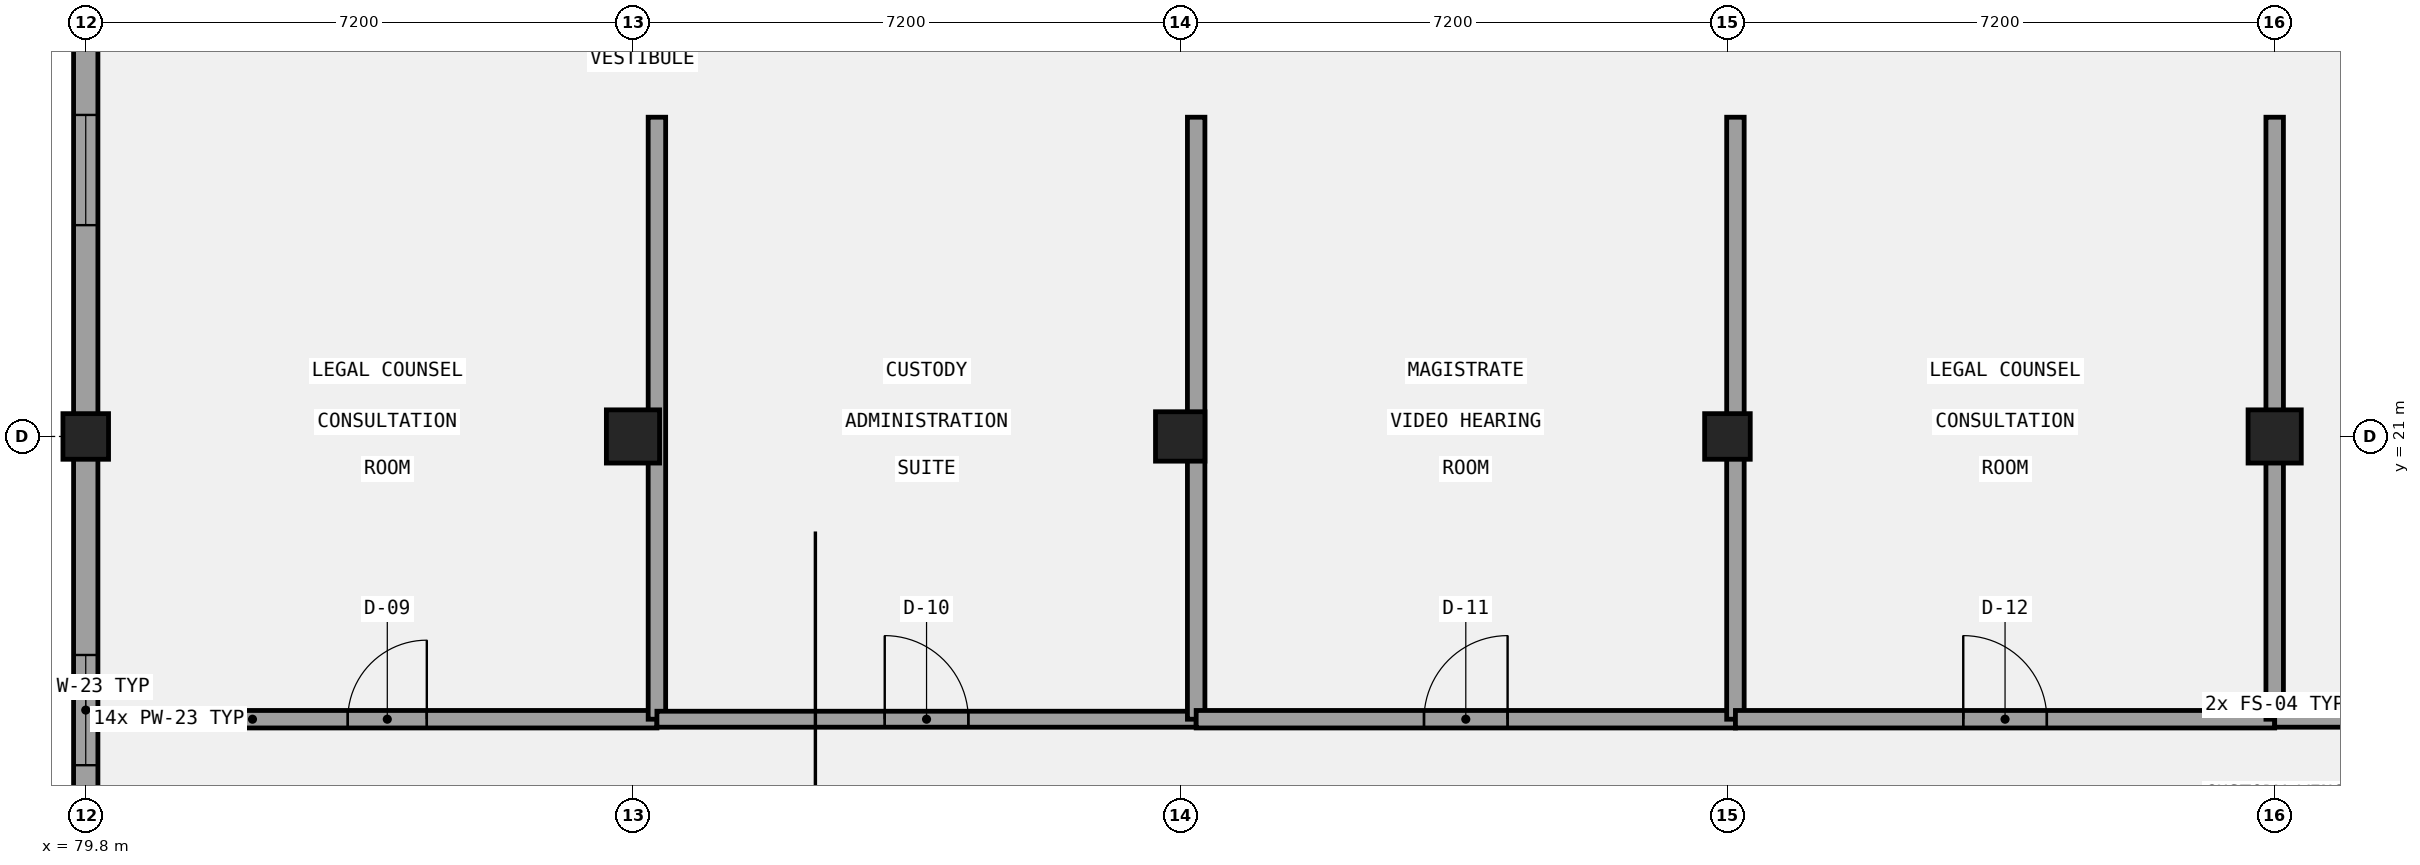
"""IFC4 building model, lengths in metres.
Left out: names, types, materials, properties, quantities, classifications, styles, units other than length and angle.
Written with IfcOpenShell. Run it as: python <this file> out.ifc"""

import sys

from ifc_helpers import new_model, si_unit, direction, frame, frame_2d, origin, origin_2d, place, context, subcontext, project, spatial, rectangle, extrude, element, fill, save


model = new_model("IFC4")
c1 = context("Model", 3, precision=1e-05, world=origin(), true_north=direction((0.0, 1.0)))
c2 = subcontext(c1, "Body", "Model", "MODEL_VIEW")
j1 = project(units=[si_unit("LENGTHUNIT", "METRE"), si_unit("PLANEANGLEUNIT", "RADIAN")], contexts=[c1])
p1 = place(None, origin())
s1 = spatial("IfcSite", under=j1, at=p1, CompositionType="ELEMENT")
p2 = place(p1, origin())
s2 = spatial("IfcBuilding", under=s1, at=p2, CompositionType="ELEMENT")
p3 = place(p2, frame((0.0, 0.0, 9.6)))
s3 = spatial("IfcBuildingStorey", under=s2, at=p3, CompositionType="ELEMENT", Elevation=9.6)
p4 = place(p3, frame((79.8, 21.0, 0.0), z_axis=(0.0, 0.0, 1.0), x_axis=(1.0, 0.0, 0.0)))
e1 = element("IfcColumn", 1, at=p4, inside=s3, PredefinedType="COLUMN", context=c2, shape_type="SweptSolid", body=[
    extrude(rectangle(XDim=0.6, YDim=0.6, at=origin_2d()), origin(), (0.0, 0.0, 1.0), 4.2),
])
p5 = place(p3, frame((87.0, 21.0, 0.0), z_axis=(0.0, 0.0, 1.0), x_axis=(1.0, 0.0, 0.0)))
e2 = element("IfcColumn", 2, at=p5, inside=s3, PredefinedType="COLUMN", context=c2, shape_type="SweptSolid", body=[
    extrude(rectangle(XDim=0.7, YDim=0.7, at=origin_2d()), origin(), (0.0, 0.0, 1.0), 4.2),
])
p6 = place(p3, frame((94.2, 21.0, 0.0), z_axis=(0.0, 0.0, 1.0), x_axis=(1.0, 0.0, 0.0)))
e3 = element("IfcColumn", 3, at=p6, inside=s3, PredefinedType="COLUMN", context=c2, shape_type="SweptSolid", body=[
    extrude(rectangle(XDim=0.65, YDim=0.65, at=origin_2d()), origin(), (0.0, 0.0, 1.0), 4.2),
])
p7 = place(p3, frame((101.4, 21.0, 0.0), z_axis=(0.0, 0.0, 1.0), x_axis=(1.0, 0.0, 0.0)))
e4 = element("IfcColumn", 4, at=p7, inside=s3, PredefinedType="COLUMN", context=c2, shape_type="SweptSolid", body=[
    extrude(rectangle(XDim=0.6, YDim=0.6, at=origin_2d()), origin(), (0.0, 0.0, 1.0), 4.2),
])
p8 = place(p3, frame((108.6, 21.0, 0.0), z_axis=(0.0, 0.0, 1.0), x_axis=(1.0, 0.0, 0.0)))
e5 = element("IfcColumn", 5, at=p8, inside=s3, PredefinedType="COLUMN", context=c2, shape_type="SweptSolid", body=[
    extrude(rectangle(XDim=0.7, YDim=0.7, at=origin_2d()), origin(), (0.0, 0.0, 1.0), 4.2),
])
p9 = place(p3, frame((79.8, 28.01, 0.0), z_axis=(0.0, 0.0, 1.0), x_axis=(0.0, -1.0, 0.0)))
e6 = element("IfcWall", 6, at=p9, inside=s3, PredefinedType="SOLIDWALL", context=c2, shape_type="SweptSolid", body=[
    extrude(rectangle(XDim=21.25, YDim=0.32, at=frame_2d((10.625, 0.0))), origin(), (0.0, 0.0, 1.0), 3.19),
])
p10 = place(p9, frame((17.005, 0.0, 1.0)))
e7 = element("IfcOpeningElement", 7, at=p10, cuts=e6, PredefinedType="OPENING", context=c2, shape_type="SweptSolid", body=[
    extrude(rectangle(XDim=1.45, YDim=1.9, at=frame_2d((0.725, 0.95))), frame((0.0, 0.17, 0.0), z_axis=(0.0, -1.0, 0.0), x_axis=(1.0, 0.0, 0.0)), (0.0, 0.0, 1.0), 0.34),
])
p11 = place(p9, frame((9.885, 0.0, 1.0)))
e8 = element("IfcOpeningElement", 8, at=p11, cuts=e6, PredefinedType="OPENING", context=c2, shape_type="SweptSolid", body=[
    extrude(rectangle(XDim=1.45, YDim=1.9, at=frame_2d((0.725, 0.95))), frame((0.0, 0.17, 0.0), z_axis=(0.0, -1.0, 0.0), x_axis=(1.0, 0.0, 0.0)), (0.0, 0.0, 1.0), 0.34),
])
p12 = place(p9, frame((2.78, 0.0, 1.0)))
e9 = element("IfcOpeningElement", 9, at=p12, cuts=e6, PredefinedType="OPENING", context=c2, shape_type="SweptSolid", body=[
    extrude(rectangle(XDim=1.45, YDim=1.9, at=frame_2d((0.725, 0.95))), frame((0.0, 0.17, 0.0), z_axis=(0.0, -1.0, 0.0), x_axis=(1.0, 0.0, 0.0)), (0.0, 0.0, 1.0), 0.34),
])
p13 = place(p3, frame((80.22, 17.28, 0.0), z_axis=(0.0, 0.0, 1.0), x_axis=(1.0, 0.0, 0.0)))
e10 = element("IfcWall", 10, at=p13, inside=s3, PredefinedType="PARTITIONING", context=c2, shape_type="SweptSolid", body=[
    extrude(rectangle(XDim=7.095, YDim=0.23, at=frame_2d((3.547, 0.0))), origin(), (0.0, 0.0, 1.0), 3.58),
])
p14 = place(p13, frame((3.028, 0.0, 0.0)))
e11 = element("IfcOpeningElement", 11, at=p14, cuts=e10, PredefinedType="OPENING", context=c2, shape_type="SweptSolid", body=[
    extrude(rectangle(XDim=1.04, YDim=2.35, at=frame_2d((0.52, 1.175))), frame((0.0, 0.125, 0.0), z_axis=(0.0, -1.0, 0.0), x_axis=(1.0, 0.0, 0.0)), (0.0, 0.0, 1.0), 0.25),
])
p15 = place(p3, frame((87.315, 17.28, 0.0), z_axis=(0.0, 0.0, 1.0), x_axis=(0.0, 1.0, 0.0)))
e12 = element("IfcWall", 12, at=p15, inside=s3, PredefinedType="PARTITIONING", context=c2, shape_type="SweptSolid", body=[
    extrude(rectangle(XDim=7.92, YDim=0.23, at=frame_2d((3.96, 0.0))), origin(), (0.0, 0.0, 1.0), 3.19),
])
p16 = place(p3, frame((87.315, 17.28, 0.0), z_axis=(0.0, 0.0, 1.0), x_axis=(1.0, 0.0, 0.0)))
e13 = element("IfcWall", 13, at=p16, inside=s3, PredefinedType="PARTITIONING", context=c2, shape_type="SweptSolid", body=[
    extrude(rectangle(XDim=7.095, YDim=0.21, at=frame_2d((3.547, 0.0))), origin(), (0.0, 0.0, 1.0), 3.69),
])
p17 = place(p16, frame((2.998, 0.0, 0.0)))
e14 = element("IfcOpeningElement", 14, at=p17, cuts=e13, PredefinedType="OPENING", context=c2, shape_type="SweptSolid", body=[
    extrude(rectangle(XDim=1.1, YDim=2.1, at=frame_2d((0.55, 1.05))), frame((0.0, 0.115, 0.0), z_axis=(0.0, -1.0, 0.0), x_axis=(1.0, 0.0, 0.0)), (0.0, 0.0, 1.0), 0.23),
])
p18 = place(p3, frame((94.41, 17.28, 0.0), z_axis=(0.0, 0.0, 1.0), x_axis=(0.0, 1.0, 0.0)))
e15 = element("IfcWall", 15, at=p18, inside=s3, PredefinedType="PARTITIONING", context=c2, shape_type="SweptSolid", body=[
    extrude(rectangle(XDim=7.92, YDim=0.23, at=frame_2d((3.96, 0.0))), origin(), (0.0, 0.0, 1.0), 3.14),
])
p19 = place(p3, frame((94.41, 17.28, 0.0), z_axis=(0.0, 0.0, 1.0), x_axis=(1.0, 0.0, 0.0)))
e16 = element("IfcWall", 16, at=p19, inside=s3, PredefinedType="PARTITIONING", context=c2, shape_type="SweptSolid", body=[
    extrude(rectangle(XDim=7.095, YDim=0.23, at=frame_2d((3.547, 0.0))), origin(), (0.0, 0.0, 1.0), 3.58),
])
p20 = place(p19, frame((2.998, 0.0, 0.0)))
e17 = element("IfcOpeningElement", 17, at=p20, cuts=e16, PredefinedType="OPENING", context=c2, shape_type="SweptSolid", body=[
    extrude(rectangle(XDim=1.1, YDim=2.22, at=frame_2d((0.55, 1.11))), frame((0.0, 0.125, 0.0), z_axis=(0.0, -1.0, 0.0), x_axis=(1.0, 0.0, 0.0)), (0.0, 0.0, 1.0), 0.25),
])
p21 = place(p3, frame((101.505, 17.28, 0.0), z_axis=(0.0, 0.0, 1.0), x_axis=(0.0, 1.0, 0.0)))
e18 = element("IfcWall", 18, at=p21, inside=s3, PredefinedType="PARTITIONING", context=c2, shape_type="SweptSolid", body=[
    extrude(rectangle(XDim=7.92, YDim=0.23, at=frame_2d((3.96, 0.0))), origin(), (0.0, 0.0, 1.0), 3.09),
])
p22 = place(p3, frame((101.505, 17.28, 0.0), z_axis=(0.0, 0.0, 1.0), x_axis=(1.0, 0.0, 0.0)))
e19 = element("IfcWall", 19, at=p22, inside=s3, PredefinedType="PARTITIONING", context=c2, shape_type="SweptSolid", body=[
    extrude(rectangle(XDim=7.095, YDim=0.23, at=frame_2d((3.548, 0.0))), origin(), (0.0, 0.0, 1.0), 3.39),
])
p23 = place(p22, frame((2.998, 0.0, 0.0)))
e20 = element("IfcOpeningElement", 20, at=p23, cuts=e19, PredefinedType="OPENING", context=c2, shape_type="SweptSolid", body=[
    extrude(rectangle(XDim=1.1, YDim=2.35, at=frame_2d((0.55, 1.175))), frame((0.0, 0.125, 0.0), z_axis=(0.0, -1.0, 0.0), x_axis=(1.0, 0.0, 0.0)), (0.0, 0.0, 1.0), 0.25),
])
p24 = place(p3, frame((108.6, 17.28, 0.0), z_axis=(0.0, 0.0, 1.0), x_axis=(0.0, 1.0, 0.0)))
e21 = element("IfcWall", 21, at=p24, inside=s3, PredefinedType="PARTITIONING", context=c2, shape_type="SweptSolid", body=[
    extrude(rectangle(XDim=7.92, YDim=0.23, at=frame_2d((3.96, 0.0))), origin(), (0.0, 0.0, 1.0), 3.04),
])
p25 = place(p3, frame((108.6, 17.28, 0.0), z_axis=(0.0, 0.0, 1.0), x_axis=(1.0, 0.0, 0.0)))
e22 = element("IfcWall", 22, at=p25, inside=s3, PredefinedType="PARTITIONING", context=c2, shape_type="SweptSolid", body=[
    extrude(rectangle(XDim=7.095, YDim=0.21, at=frame_2d((3.547, 0.0))), origin(), (0.0, 0.0, 1.0), 3.39),
])
p26 = place(p25, frame((2.938, 0.0, 0.0)))
e23 = element("IfcOpeningElement", 23, at=p26, cuts=e22, PredefinedType="OPENING", context=c2, shape_type="SweptSolid", body=[
    extrude(rectangle(XDim=1.22, YDim=2.1, at=frame_2d((0.61, 1.05))), frame((0.0, 0.115, 0.0), z_axis=(0.0, -1.0, 0.0), x_axis=(1.0, 0.0, 0.0)), (0.0, 0.0, 1.0), 0.23),
])
p27 = place(p11, origin())
e24 = element("IfcWindow", 24, at=p27, inside=s3, PartitioningType="SINGLE_PANEL", PredefinedType="WINDOW", context=c2, shape_type="SweptSolid", body=[
    extrude(rectangle(XDim=1.45, YDim=1.9, at=frame_2d((0.725, 0.95))), frame((0.0, 0.03, 0.0), z_axis=(0.0, -1.0, 0.0), x_axis=(1.0, 0.0, 0.0)), (0.0, 0.0, 1.0), 0.06),
])
fill(e8, e24)
p28 = place(p12, origin())
e25 = element("IfcWindow", 25, at=p28, inside=s3, PartitioningType="SINGLE_PANEL", PredefinedType="WINDOW", context=c2, shape_type="SweptSolid", body=[
    extrude(rectangle(XDim=1.45, YDim=1.9, at=frame_2d((0.725, 0.95))), frame((0.0, 0.03, 0.0), z_axis=(0.0, -1.0, 0.0), x_axis=(1.0, 0.0, 0.0)), (0.0, 0.0, 1.0), 0.06),
])
fill(e9, e25)
p29 = place(p14, origin())
e26 = element("IfcDoor", 26, at=p29, inside=s3, OperationType="SINGLE_SWING_RIGHT", PredefinedType="DOOR", context=c2, shape_type="SweptSolid", body=[
    extrude(rectangle(XDim=1.04, YDim=2.35, at=frame_2d((0.52, 1.175))), frame((0.0, 0.025, 0.0), z_axis=(0.0, -1.0, 0.0), x_axis=(1.0, 0.0, 0.0)), (0.0, 0.0, 1.0), 0.05),
])
fill(e11, e26)
p30 = place(p17, origin())
e27 = element("IfcDoor", 27, at=p30, inside=s3, OperationType="SINGLE_SWING_LEFT", PredefinedType="DOOR", context=c2, shape_type="SweptSolid", body=[
    extrude(rectangle(XDim=1.1, YDim=2.1, at=frame_2d((0.55, 1.05))), frame((0.0, 0.025, 0.0), z_axis=(0.0, -1.0, 0.0), x_axis=(1.0, 0.0, 0.0)), (0.0, 0.0, 1.0), 0.05),
])
fill(e14, e27)
p31 = place(p20, origin())
e28 = element("IfcDoor", 28, at=p31, inside=s3, OperationType="SINGLE_SWING_RIGHT", PredefinedType="DOOR", context=c2, shape_type="SweptSolid", body=[
    extrude(rectangle(XDim=1.1, YDim=2.22, at=frame_2d((0.55, 1.11))), frame((0.0, 0.025, 0.0), z_axis=(0.0, -1.0, 0.0), x_axis=(1.0, 0.0, 0.0)), (0.0, 0.0, 1.0), 0.05),
])
fill(e17, e28)
p32 = place(p23, origin())
e29 = element("IfcDoor", 29, at=p32, inside=s3, OperationType="SINGLE_SWING_LEFT", PredefinedType="DOOR", context=c2, shape_type="SweptSolid", body=[
    extrude(rectangle(XDim=1.1, YDim=2.35, at=frame_2d((0.55, 1.175))), frame((0.0, 0.025, 0.0), z_axis=(0.0, -1.0, 0.0), x_axis=(1.0, 0.0, 0.0)), (0.0, 0.0, 1.0), 0.05),
])
fill(e20, e29)
save(model, sys.argv[1])
